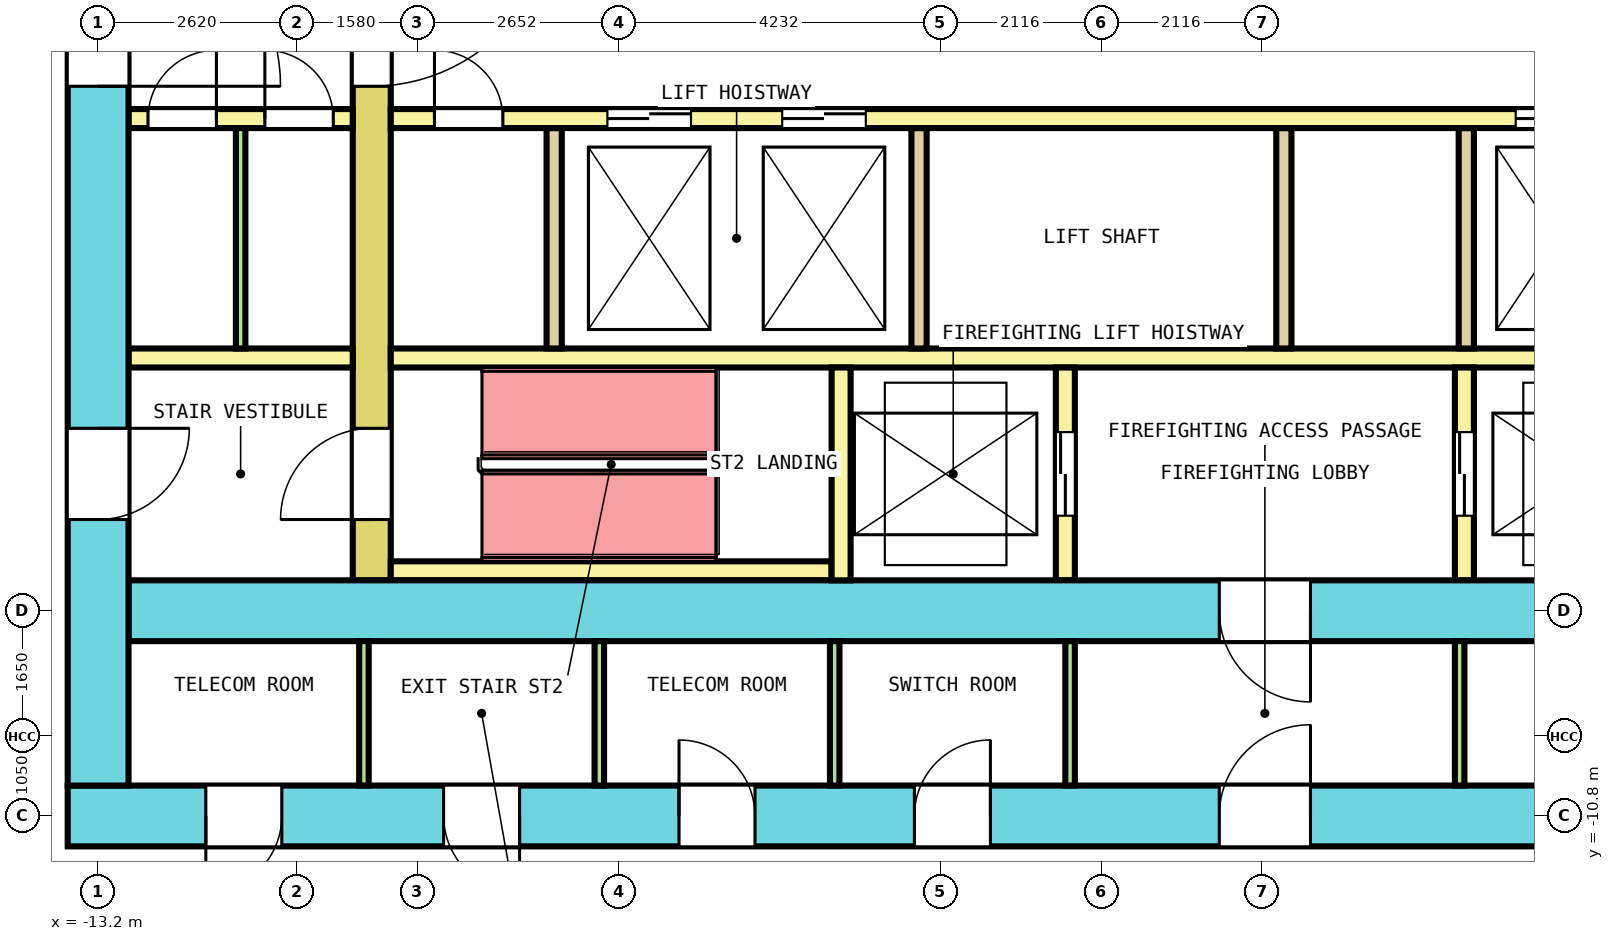
"""IFC4 building model, lengths in metres.
Left out: names, types, materials, properties, quantities, classifications, styles, units other than length and angle.
Written with IfcOpenShell. Run it as: python <this file> out.ifc"""

import sys

from ifc_helpers import new_model, si_unit, direction, frame, frame_2d, origin, place, context, subcontext, project, spatial, rectangle, extrude, element, fill, save


model = new_model("IFC4")
c1 = context("Model", 3, precision=1e-05, world=origin(), true_north=direction((0.0, 1.0)))
c2 = subcontext(c1, "Body", "Model", "MODEL_VIEW")
j1 = project(units=[si_unit("LENGTHUNIT", "METRE"), si_unit("PLANEANGLEUNIT", "RADIAN")], contexts=[c1])
p1 = place(None, origin())
s1 = spatial("IfcSite", under=j1, at=p1, CompositionType="ELEMENT")
p2 = place(p1, origin())
s2 = spatial("IfcBuilding", under=s1, at=p2, CompositionType="ELEMENT")
p3 = place(p2, frame((0.0, 0.0, 117.6)))
s3 = spatial("IfcBuildingStorey", under=s2, at=p3, CompositionType="ELEMENT", Elevation=117.6)
p4 = place(p3, frame((-13.6, -10.8, 0.0), z_axis=(0.0, 0.0, 1.0), x_axis=(1.0, 0.0, 0.0)))
e1 = element("IfcWall", 1, at=p4, inside=s3, PredefinedType="SHEAR", context=c2, shape_type="SweptSolid", body=[
    extrude(rectangle(XDim=27.2, YDim=0.8, at=frame_2d((13.6, 0.0))), origin(), (0.0, 0.0, 1.0), 4.1),
])
p5 = place(p4, frame((1.817, 0.0, 0.0)))
e2 = element("IfcOpeningElement", 2, at=p5, cuts=e1, PredefinedType="OPENING", context=c2, shape_type="SweptSolid", body=[
    extrude(rectangle(XDim=1.0, YDim=2.1, at=frame_2d((0.5, 1.05))), frame((0.0, 0.41, 0.0), z_axis=(0.0, -1.0, 0.0), x_axis=(1.0, 0.0, 0.0)), (0.0, 0.0, 1.0), 0.82),
])
p6 = place(p4, frame((4.945, 0.0, 0.0)))
e3 = element("IfcOpeningElement", 3, at=p6, cuts=e1, PredefinedType="OPENING", context=c2, shape_type="SweptSolid", body=[
    extrude(rectangle(XDim=1.0, YDim=2.1, at=frame_2d((0.5, 1.05))), frame((0.0, 0.41, 0.0), z_axis=(0.0, -1.0, 0.0), x_axis=(1.0, 0.0, 0.0)), (0.0, 0.0, 1.0), 0.82),
])
p7 = place(p4, frame((8.042, 0.0, 0.0)))
e4 = element("IfcOpeningElement", 4, at=p7, cuts=e1, PredefinedType="OPENING", context=c2, shape_type="SweptSolid", body=[
    extrude(rectangle(XDim=1.0, YDim=2.1, at=frame_2d((0.5, 1.05))), frame((0.0, 0.41, 0.0), z_axis=(0.0, -1.0, 0.0), x_axis=(1.0, 0.0, 0.0)), (0.0, 0.0, 1.0), 0.82),
])
p8 = place(p4, frame((11.139, 0.0, 0.0)))
e5 = element("IfcOpeningElement", 5, at=p8, cuts=e1, PredefinedType="OPENING", context=c2, shape_type="SweptSolid", body=[
    extrude(rectangle(XDim=1.0, YDim=2.1, at=frame_2d((0.5, 1.05))), frame((0.0, 0.41, 0.0), z_axis=(0.0, -1.0, 0.0), x_axis=(1.0, 0.0, 0.0)), (0.0, 0.0, 1.0), 0.82),
])
p9 = place(p4, frame((21.887, 0.0, 0.0)))
e6 = element("IfcOpeningElement", 6, at=p9, cuts=e1, PredefinedType="OPENING", context=c2, shape_type="SweptSolid", body=[
    extrude(rectangle(XDim=1.0, YDim=2.1, at=frame_2d((0.5, 1.05))), frame((0.0, 0.41, 0.0), z_axis=(0.0, -1.0, 0.0), x_axis=(1.0, 0.0, 0.0)), (0.0, 0.0, 1.0), 0.82),
])
p10 = place(p4, frame((15.15, 0.0, 0.0)))
e7 = element("IfcOpeningElement", 7, at=p10, cuts=e1, PredefinedType="OPENING", context=c2, shape_type="SweptSolid", body=[
    extrude(rectangle(XDim=1.2, YDim=2.1, at=frame_2d((0.6, 1.05))), frame((0.0, 0.41, 0.0), z_axis=(0.0, -1.0, 0.0), x_axis=(1.0, 0.0, 0.0)), (0.0, 0.0, 1.0), 0.82),
])
p11 = place(p3, frame((-13.2, -10.4, 0.0), z_axis=(0.0, 0.0, 1.0), x_axis=(0.0, 1.0, 0.0)))
e8 = element("IfcWall", 8, at=p11, inside=s3, PredefinedType="SHEAR", context=c2, shape_type="SweptSolid", body=[
    extrude(rectangle(XDim=20.8, YDim=0.8, at=frame_2d((10.4, 0.0))), origin(), (0.0, 0.0, 1.0), 4.1),
])
p12 = place(p11, frame((9.2, 0.0, 0.0)))
e9 = element("IfcOpeningElement", 9, at=p12, cuts=e8, PredefinedType="OPENING", context=c2, shape_type="SweptSolid", body=[
    extrude(rectangle(XDim=2.4, YDim=2.1, at=frame_2d((1.2, 1.05))), frame((0.0, 0.41, 0.0), z_axis=(0.0, -1.0, 0.0), x_axis=(1.0, 0.0, 0.0)), (0.0, 0.0, 1.0), 0.82),
])
p13 = place(p11, frame((16.1, 0.0, 0.0)))
e10 = element("IfcOpeningElement", 10, at=p13, cuts=e8, PredefinedType="OPENING", context=c2, shape_type="SweptSolid", body=[
    extrude(rectangle(XDim=1.2, YDim=2.1, at=frame_2d((0.6, 1.05))), frame((0.0, 0.41, 0.0), z_axis=(0.0, -1.0, 0.0), x_axis=(1.0, 0.0, 0.0)), (0.0, 0.0, 1.0), 0.82),
])
p14 = place(p11, frame((3.5, 0.0, 0.0)))
e11 = element("IfcOpeningElement", 11, at=p14, cuts=e8, PredefinedType="OPENING", context=c2, shape_type="SweptSolid", body=[
    extrude(rectangle(XDim=1.2, YDim=2.1, at=frame_2d((0.6, 1.05))), frame((0.0, 0.41, 0.0), z_axis=(0.0, -1.0, 0.0), x_axis=(1.0, 0.0, 0.0)), (0.0, 0.0, 1.0), 0.82),
])
p15 = place(p3, frame((-12.8, -8.1, 0.0), z_axis=(0.0, 0.0, 1.0), x_axis=(1.0, 0.0, 0.0)))
e12 = element("IfcWall", 12, at=p15, inside=s3, PredefinedType="SHEAR", context=c2, shape_type="SweptSolid", body=[
    extrude(rectangle(XDim=25.6, YDim=0.8, at=frame_2d((12.8, 0.0))), origin(), (0.0, 0.0, 1.0), 4.1),
])
p16 = place(p15, frame((14.35, 0.0, 0.0)))
e13 = element("IfcOpeningElement", 13, at=p16, cuts=e12, PredefinedType="OPENING", context=c2, shape_type="SweptSolid", body=[
    extrude(rectangle(XDim=1.2, YDim=2.1, at=frame_2d((0.6, 1.05))), frame((0.0, 0.41, 0.0), z_axis=(0.0, -1.0, 0.0), x_axis=(1.0, 0.0, 0.0)), (0.0, 0.0, 1.0), 0.82),
])
p17 = place(p3, frame((-9.6, -7.7, 0.0), z_axis=(0.0, 0.0, 1.0), x_axis=(0.0, 1.0, 0.0)))
e14 = element("IfcWall", 14, at=p17, inside=s3, PredefinedType="SHEAR", context=c2, shape_type="SweptSolid", body=[
    extrude(rectangle(XDim=15.4, YDim=0.5, at=frame_2d((7.7, 0.0))), origin(), (0.0, 0.0, 1.0), 4.1),
])
p18 = place(p17, frame((6.5, 0.0, 0.0)))
e15 = element("IfcOpeningElement", 15, at=p18, cuts=e14, PredefinedType="OPENING", context=c2, shape_type="SweptSolid", body=[
    extrude(rectangle(XDim=2.4, YDim=2.1, at=frame_2d((1.2, 1.05))), frame((0.0, 0.26, 0.0), z_axis=(0.0, -1.0, 0.0), x_axis=(1.0, 0.0, 0.0)), (0.0, 0.0, 1.0), 0.52),
])
p19 = place(p17, frame((13.4, 0.0, 0.0)))
e16 = element("IfcOpeningElement", 16, at=p19, cuts=e14, PredefinedType="OPENING", context=c2, shape_type="SweptSolid", body=[
    extrude(rectangle(XDim=1.2, YDim=2.1, at=frame_2d((0.6, 1.05))), frame((0.0, 0.26, 0.0), z_axis=(0.0, -1.0, 0.0), x_axis=(1.0, 0.0, 0.0)), (0.0, 0.0, 1.0), 0.52),
])
p20 = place(p17, frame((0.8, 0.0, 0.0)))
e17 = element("IfcOpeningElement", 17, at=p20, cuts=e14, PredefinedType="OPENING", context=c2, shape_type="SweptSolid", body=[
    extrude(rectangle(XDim=1.2, YDim=2.1, at=frame_2d((0.6, 1.05))), frame((0.0, 0.26, 0.0), z_axis=(0.0, -1.0, 0.0), x_axis=(1.0, 0.0, 0.0)), (0.0, 0.0, 1.0), 0.52),
])
p21 = place(p3, frame((-12.8, -1.625, 0.0), z_axis=(0.0, 0.0, 1.0), x_axis=(1.0, 0.0, 0.0)))
e18 = element("IfcWall", 18, at=p21, inside=s3, PredefinedType="SOLIDWALL", context=c2, shape_type="SweptSolid", body=[
    extrude(rectangle(XDim=2.95, YDim=0.25, at=frame_2d((1.475, 0.0))), origin(), (0.0, 0.0, 1.0), 4.1),
])
p22 = place(p21, frame((0.256, 0.0, 0.0)))
e19 = element("IfcOpeningElement", 19, at=p22, cuts=e18, PredefinedType="OPENING", context=c2, shape_type="SweptSolid", body=[
    extrude(rectangle(XDim=0.9, YDim=2.1, at=frame_2d((0.45, 1.05))), frame((0.0, 0.135, 0.0), z_axis=(0.0, -1.0, 0.0), x_axis=(1.0, 0.0, 0.0)), (0.0, 0.0, 1.0), 0.27),
])
p23 = place(p21, frame((1.794, 0.0, 0.0)))
e20 = element("IfcOpeningElement", 20, at=p23, cuts=e18, PredefinedType="OPENING", context=c2, shape_type="SweptSolid", body=[
    extrude(rectangle(XDim=0.9, YDim=2.1, at=frame_2d((0.45, 1.05))), frame((0.0, 0.135, 0.0), z_axis=(0.0, -1.0, 0.0), x_axis=(1.0, 0.0, 0.0)), (0.0, 0.0, 1.0), 0.27),
])
p24 = place(p3, frame((-9.35, -1.625, 0.0), z_axis=(0.0, 0.0, 1.0), x_axis=(1.0, 0.0, 0.0)))
e21 = element("IfcWall", 21, at=p24, inside=s3, PredefinedType="SOLIDWALL", context=c2, shape_type="SweptSolid", body=[
    extrude(rectangle(XDim=18.7, YDim=0.25, at=frame_2d((9.35, 0.0))), origin(), (0.0, 0.0, 1.0), 4.1),
])
p25 = place(p24, frame((2.85, 0.0, 0.0)))
e22 = element("IfcOpeningElement", 22, at=p25, cuts=e21, PredefinedType="OPENING", context=c2, shape_type="SweptSolid", body=[
    extrude(rectangle(XDim=1.1, YDim=2.1, at=frame_2d((0.55, 1.05))), frame((0.0, 0.135, 0.0), z_axis=(0.0, -1.0, 0.0), x_axis=(1.0, 0.0, 0.0)), (0.0, 0.0, 1.0), 0.27),
])
p26 = place(p24, frame((5.15, 0.0, 0.0)))
e23 = element("IfcOpeningElement", 23, at=p26, cuts=e21, PredefinedType="OPENING", context=c2, shape_type="SweptSolid", body=[
    extrude(rectangle(XDim=1.1, YDim=2.1, at=frame_2d((0.55, 1.05))), frame((0.0, 0.135, 0.0), z_axis=(0.0, -1.0, 0.0), x_axis=(1.0, 0.0, 0.0)), (0.0, 0.0, 1.0), 0.27),
])
p27 = place(p24, frame((14.8, 0.0, 0.0)))
e24 = element("IfcOpeningElement", 24, at=p27, cuts=e21, PredefinedType="OPENING", context=c2, shape_type="SweptSolid", body=[
    extrude(rectangle(XDim=1.1, YDim=2.1, at=frame_2d((0.55, 1.05))), frame((0.0, 0.135, 0.0), z_axis=(0.0, -1.0, 0.0), x_axis=(1.0, 0.0, 0.0)), (0.0, 0.0, 1.0), 0.27),
])
p28 = place(p24, frame((0.575, 0.0, 0.0)))
e25 = element("IfcOpeningElement", 25, at=p28, cuts=e21, PredefinedType="OPENING", context=c2, shape_type="SweptSolid", body=[
    extrude(rectangle(XDim=0.9, YDim=2.1, at=frame_2d((0.45, 1.05))), frame((0.0, 0.135, 0.0), z_axis=(0.0, -1.0, 0.0), x_axis=(1.0, 0.0, 0.0)), (0.0, 0.0, 1.0), 0.27),
])
p29 = place(p24, frame((17.225, 0.0, 0.0)))
e26 = element("IfcOpeningElement", 26, at=p29, cuts=e21, PredefinedType="OPENING", context=c2, shape_type="SweptSolid", body=[
    extrude(rectangle(XDim=0.9, YDim=2.1, at=frame_2d((0.45, 1.05))), frame((0.0, 0.135, 0.0), z_axis=(0.0, -1.0, 0.0), x_axis=(1.0, 0.0, 0.0)), (0.0, 0.0, 1.0), 0.27),
])
p30 = place(p3, frame((-12.8, -4.775, 0.0), z_axis=(0.0, 0.0, 1.0), x_axis=(1.0, 0.0, 0.0)))
e27 = element("IfcWall", 27, at=p30, inside=s3, PredefinedType="SOLIDWALL", context=c2, shape_type="SweptSolid", body=[
    extrude(rectangle(XDim=2.95, YDim=0.25, at=frame_2d((1.475, 0.0))), origin(), (0.0, 0.0, 1.0), 4.1),
])
p31 = place(p3, frame((-9.35, -4.775, 0.0), z_axis=(0.0, 0.0, 1.0), x_axis=(1.0, 0.0, 0.0)))
e28 = element("IfcWall", 28, at=p31, inside=s3, PredefinedType="SOLIDWALL", context=c2, shape_type="SweptSolid", body=[
    extrude(rectangle(XDim=18.7, YDim=0.25, at=frame_2d((9.35, 0.0))), origin(), (0.0, 0.0, 1.0), 4.1),
])
for number, where, z_axis, x_axis in (
    (29, (-7.2, -4.65, 0.0), (0.0, 0.0, 1.0), (0.0, 1.0, 0.0)),
    (30, (-2.4, -4.65, 0.0), (0.0, 0.0, 1.0), (0.0, 1.0, 0.0)),
    (31, (2.4, -4.65, 0.0), (0.0, 0.0, 1.0), (0.0, 1.0, 0.0)),
    (32, (4.8, -4.65, 0.0), (0.0, 0.0, 1.0), (0.0, 1.0, 0.0)),
):
    element("IfcWall", number, at=place(p3, frame(where, z_axis=z_axis, x_axis=x_axis)), inside=s3, PredefinedType="SOLIDWALL", context=c2, shape_type="SweptSolid", body=[
        extrude(rectangle(XDim=2.9, YDim=0.2, at=frame_2d((1.45, 0.0))), origin(), (0.0, 0.0, 1.0), 4.1),
    ])
p32 = place(p3, frame((-9.35, -7.575, 0.0), z_axis=(0.0, 0.0, 1.0), x_axis=(1.0, 0.0, 0.0)))
e33 = element("IfcWall", 33, at=p32, inside=s3, PredefinedType="SOLIDWALL", context=c2, shape_type="SweptSolid", body=[
    extrude(rectangle(XDim=5.8, YDim=0.25, at=frame_2d((2.9, 0.0))), origin(), (0.0, 0.0, 1.0), 4.1),
])
p33 = place(p3, frame((-3.425, -7.7, 0.0), z_axis=(0.0, 0.0, 1.0), x_axis=(0.0, 1.0, 0.0)))
e34 = element("IfcWall", 34, at=p33, inside=s3, PredefinedType="SOLIDWALL", context=c2, shape_type="SweptSolid", body=[
    extrude(rectangle(XDim=2.8, YDim=0.25, at=frame_2d((1.4, 0.0))), origin(), (0.0, 0.0, 1.0), 4.1),
])
p34 = place(p3, frame((-0.475, -7.7, 0.0), z_axis=(0.0, 0.0, 1.0), x_axis=(0.0, 1.0, 0.0)))
e35 = element("IfcWall", 35, at=p34, inside=s3, PredefinedType="SOLIDWALL", context=c2, shape_type="SweptSolid", body=[
    extrude(rectangle(XDim=2.8, YDim=0.25, at=frame_2d((1.4, 0.0))), origin(), (0.0, 0.0, 1.0), 4.1),
])
p35 = place(p34, frame((0.85, 0.0, 0.0)))
e36 = element("IfcOpeningElement", 36, at=p35, cuts=e35, PredefinedType="OPENING", context=c2, shape_type="SweptSolid", body=[
    extrude(rectangle(XDim=1.1, YDim=2.1, at=frame_2d((0.55, 1.05))), frame((0.0, 0.135, 0.0), z_axis=(0.0, -1.0, 0.0), x_axis=(1.0, 0.0, 0.0)), (0.0, 0.0, 1.0), 0.27),
])
p36 = place(p3, frame((4.775, -7.7, 0.0), z_axis=(0.0, 0.0, 1.0), x_axis=(0.0, 1.0, 0.0)))
e37 = element("IfcWall", 37, at=p36, inside=s3, PredefinedType="SOLIDWALL", context=c2, shape_type="SweptSolid", body=[
    extrude(rectangle(XDim=2.8, YDim=0.25, at=frame_2d((1.4, 0.0))), origin(), (0.0, 0.0, 1.0), 4.1),
])
p37 = place(p36, frame((0.85, 0.0, 0.0)))
e38 = element("IfcOpeningElement", 38, at=p37, cuts=e37, PredefinedType="OPENING", context=c2, shape_type="SweptSolid", body=[
    extrude(rectangle(XDim=1.1, YDim=2.1, at=frame_2d((0.55, 1.05))), frame((0.0, 0.135, 0.0), z_axis=(0.0, -1.0, 0.0), x_axis=(1.0, 0.0, 0.0)), (0.0, 0.0, 1.0), 0.27),
])
for number, where, z_axis, x_axis in (
    (39, (-9.703, -10.4, 0.0), (0.0, 0.0, 1.0), (0.0, 1.0, 0.0)),
    (40, (-6.606, -10.4, 0.0), (0.0, 0.0, 1.0), (0.0, 1.0, 0.0)),
    (41, (-3.51, -10.4, 0.0), (0.0, 0.0, 1.0), (0.0, 1.0, 0.0)),
    (42, (-0.413, -10.4, 0.0), (0.0, 0.0, 1.0), (0.0, 1.0, 0.0)),
    (43, (4.712, -10.4, 0.0), (0.0, 0.0, 1.0), (0.0, 1.0, 0.0)),
):
    element("IfcWall", number, at=place(p3, frame(where, z_axis=z_axis, x_axis=x_axis)), inside=s3, PredefinedType="PARTITIONING", context=c2, shape_type="SweptSolid", body=[
        extrude(rectangle(XDim=1.9, YDim=0.125, at=frame_2d((0.95, 0.0))), origin(), (0.0, 0.0, 1.0), 3.05),
    ])
p38 = place(p3, frame((-11.325, -4.65, 0.0), z_axis=(0.0, 0.0, 1.0), x_axis=(0.0, 1.0, 0.0)))
e44 = element("IfcWall", 44, at=p38, inside=s3, PredefinedType="PARTITIONING", context=c2, shape_type="SweptSolid", body=[
    extrude(rectangle(XDim=2.9, YDim=0.125, at=frame_2d((1.45, 0.0))), origin(), (0.0, 0.0, 1.0), 4.1),
])
p39 = place(p25, origin())
e45 = element("IfcDoor", 45, at=p39, inside=s3, OperationType="DOUBLE_DOOR_SLIDING", PredefinedType="DOOR", context=c2, shape_type="SweptSolid", body=[
    extrude(rectangle(XDim=1.1, YDim=2.1, at=frame_2d((0.55, 1.05))), frame((0.0, 0.075, 0.0), z_axis=(0.0, -1.0, 0.0), x_axis=(1.0, 0.0, 0.0)), (0.0, 0.0, 1.0), 0.15),
])
fill(e22, e45)
p40 = place(p26, origin())
e46 = element("IfcDoor", 46, at=p40, inside=s3, OperationType="DOUBLE_DOOR_SLIDING", PredefinedType="DOOR", context=c2, shape_type="SweptSolid", body=[
    extrude(rectangle(XDim=1.1, YDim=2.1, at=frame_2d((0.55, 1.05))), frame((0.0, 0.075, 0.0), z_axis=(0.0, -1.0, 0.0), x_axis=(1.0, 0.0, 0.0)), (0.0, 0.0, 1.0), 0.15),
])
fill(e23, e46)
p41 = place(p27, origin())
e47 = element("IfcDoor", 47, at=p41, inside=s3, OperationType="DOUBLE_DOOR_SLIDING", PredefinedType="DOOR", context=c2, shape_type="SweptSolid", body=[
    extrude(rectangle(XDim=1.1, YDim=2.1, at=frame_2d((0.55, 1.05))), frame((0.0, 0.075, 0.0), z_axis=(0.0, -1.0, 0.0), x_axis=(1.0, 0.0, 0.0)), (0.0, 0.0, 1.0), 0.15),
])
fill(e24, e47)
p42 = place(p35, origin())
e48 = element("IfcDoor", 48, at=p42, inside=s3, OperationType="DOUBLE_DOOR_SLIDING", PredefinedType="DOOR", context=c2, shape_type="SweptSolid", body=[
    extrude(rectangle(XDim=1.1, YDim=2.1, at=frame_2d((0.55, 1.05))), frame((0.0, 0.075, 0.0), z_axis=(0.0, -1.0, 0.0), x_axis=(1.0, 0.0, 0.0)), (0.0, 0.0, 1.0), 0.15),
])
fill(e36, e48)
p43 = place(p37, origin())
e49 = element("IfcDoor", 49, at=p43, inside=s3, OperationType="DOUBLE_DOOR_SLIDING", PredefinedType="DOOR", context=c2, shape_type="SweptSolid", body=[
    extrude(rectangle(XDim=1.1, YDim=2.1, at=frame_2d((0.55, 1.05))), frame((0.0, 0.075, 0.0), z_axis=(0.0, -1.0, 0.0), x_axis=(1.0, 0.0, 0.0)), (0.0, 0.0, 1.0), 0.15),
])
fill(e38, e49)
p44 = place(p18, origin())
e50 = element("IfcDoor", 50, at=p44, inside=s3, OperationType="DOUBLE_DOOR_SINGLE_SWING", PredefinedType="DOOR", context=c2, shape_type="SweptSolid", body=[
    extrude(rectangle(XDim=2.4, YDim=2.1, at=frame_2d((1.2, 1.05))), frame((0.0, 0.2, 0.0), z_axis=(0.0, -1.0, 0.0), x_axis=(1.0, 0.0, 0.0)), (0.0, 0.0, 1.0), 0.4),
])
fill(e15, e50)
p45 = place(p12, origin())
e51 = element("IfcDoor", 51, at=p45, inside=s3, OperationType="DOUBLE_DOOR_SINGLE_SWING", PredefinedType="DOOR", context=c2, shape_type="SweptSolid", body=[
    extrude(rectangle(XDim=2.4, YDim=2.1, at=frame_2d((1.2, 1.05))), frame((0.0, 0.3, 0.0), z_axis=(0.0, -1.0, 0.0), x_axis=(1.0, 0.0, 0.0)), (0.0, 0.0, 1.0), 0.6),
])
fill(e9, e51)
p46 = place(p20, origin())
e52 = element("IfcDoor", 52, at=p46, inside=s3, OperationType="SINGLE_SWING_LEFT", PredefinedType="DOOR", context=c2, shape_type="SweptSolid", body=[
    extrude(rectangle(XDim=1.2, YDim=2.1, at=frame_2d((0.6, 1.05))), frame((0.0, 0.2, 0.0), z_axis=(0.0, -1.0, 0.0), x_axis=(1.0, 0.0, 0.0)), (0.0, 0.0, 1.0), 0.4),
])
fill(e17, e52)
p47 = place(p14, origin())
e53 = element("IfcDoor", 53, at=p47, inside=s3, OperationType="SINGLE_SWING_RIGHT", PredefinedType="DOOR", context=c2, shape_type="SweptSolid", body=[
    extrude(rectangle(XDim=1.2, YDim=2.1, at=frame_2d((0.6, 1.05))), frame((0.0, 0.3, 0.0), z_axis=(0.0, -1.0, 0.0), x_axis=(1.0, 0.0, 0.0)), (0.0, 0.0, 1.0), 0.6),
])
fill(e11, e53)
p48 = place(p16, origin())
e54 = element("IfcDoor", 54, at=p48, inside=s3, OperationType="SINGLE_SWING_LEFT", PredefinedType="DOOR", context=c2, shape_type="SweptSolid", body=[
    extrude(rectangle(XDim=1.2, YDim=2.1, at=frame_2d((0.6, 1.05))), frame((0.0, 0.3, 0.0), z_axis=(0.0, -1.0, 0.0), x_axis=(1.0, 0.0, 0.0)), (0.0, 0.0, 1.0), 0.6),
])
fill(e13, e54)
p49 = place(p5, origin())
e55 = element("IfcDoor", 55, at=p49, inside=s3, OperationType="SINGLE_SWING_RIGHT", PredefinedType="DOOR", context=c2, shape_type="SweptSolid", body=[
    extrude(rectangle(XDim=1.0, YDim=2.1, at=frame_2d((0.5, 1.05))), frame((0.0, 0.3, 0.0), z_axis=(0.0, -1.0, 0.0), x_axis=(1.0, 0.0, 0.0)), (0.0, 0.0, 1.0), 0.6),
])
fill(e2, e55)
p50 = place(p6, origin())
e56 = element("IfcDoor", 56, at=p50, inside=s3, OperationType="SINGLE_SWING_LEFT", PredefinedType="DOOR", context=c2, shape_type="SweptSolid", body=[
    extrude(rectangle(XDim=1.0, YDim=2.1, at=frame_2d((0.5, 1.05))), frame((0.0, 0.3, 0.0), z_axis=(0.0, -1.0, 0.0), x_axis=(1.0, 0.0, 0.0)), (0.0, 0.0, 1.0), 0.6),
])
fill(e3, e56)
p51 = place(p7, origin())
e57 = element("IfcDoor", 57, at=p51, inside=s3, OperationType="SINGLE_SWING_RIGHT", PredefinedType="DOOR", context=c2, shape_type="SweptSolid", body=[
    extrude(rectangle(XDim=1.0, YDim=2.1, at=frame_2d((0.5, 1.05))), frame((0.0, 0.3, 0.0), z_axis=(0.0, -1.0, 0.0), x_axis=(1.0, 0.0, 0.0)), (0.0, 0.0, 1.0), 0.6),
])
fill(e4, e57)
p52 = place(p8, origin())
e58 = element("IfcDoor", 58, at=p52, inside=s3, OperationType="SINGLE_SWING_LEFT", PredefinedType="DOOR", context=c2, shape_type="SweptSolid", body=[
    extrude(rectangle(XDim=1.0, YDim=2.1, at=frame_2d((0.5, 1.05))), frame((0.0, 0.3, 0.0), z_axis=(0.0, -1.0, 0.0), x_axis=(1.0, 0.0, 0.0)), (0.0, 0.0, 1.0), 0.6),
])
fill(e5, e58)
p53 = place(p10, origin())
e59 = element("IfcDoor", 59, at=p53, inside=s3, OperationType="SINGLE_SWING_LEFT", PredefinedType="DOOR", context=c2, shape_type="SweptSolid", body=[
    extrude(rectangle(XDim=1.2, YDim=2.1, at=frame_2d((0.6, 1.05))), frame((0.0, 0.3, 0.0), z_axis=(0.0, -1.0, 0.0), x_axis=(1.0, 0.0, 0.0)), (0.0, 0.0, 1.0), 0.6),
])
fill(e7, e59)
p54 = place(p22, origin())
e60 = element("IfcDoor", 60, at=p54, inside=s3, OperationType="SINGLE_SWING_RIGHT", PredefinedType="DOOR", context=c2, shape_type="SweptSolid", body=[
    extrude(rectangle(XDim=0.9, YDim=2.1, at=frame_2d((0.45, 1.05))), frame((0.0, 0.075, 0.0), z_axis=(0.0, -1.0, 0.0), x_axis=(1.0, 0.0, 0.0)), (0.0, 0.0, 1.0), 0.15),
])
fill(e19, e60)
p55 = place(p23, origin())
e61 = element("IfcDoor", 61, at=p55, inside=s3, OperationType="SINGLE_SWING_LEFT", PredefinedType="DOOR", context=c2, shape_type="SweptSolid", body=[
    extrude(rectangle(XDim=0.9, YDim=2.1, at=frame_2d((0.45, 1.05))), frame((0.0, 0.075, 0.0), z_axis=(0.0, -1.0, 0.0), x_axis=(1.0, 0.0, 0.0)), (0.0, 0.0, 1.0), 0.15),
])
fill(e20, e61)
p56 = place(p28, origin())
e62 = element("IfcDoor", 62, at=p56, inside=s3, OperationType="SINGLE_SWING_RIGHT", PredefinedType="DOOR", context=c2, shape_type="SweptSolid", body=[
    extrude(rectangle(XDim=0.9, YDim=2.1, at=frame_2d((0.45, 1.05))), frame((0.0, 0.075, 0.0), z_axis=(0.0, -1.0, 0.0), x_axis=(1.0, 0.0, 0.0)), (0.0, 0.0, 1.0), 0.15),
])
fill(e25, e62)
save(model, sys.argv[1])
